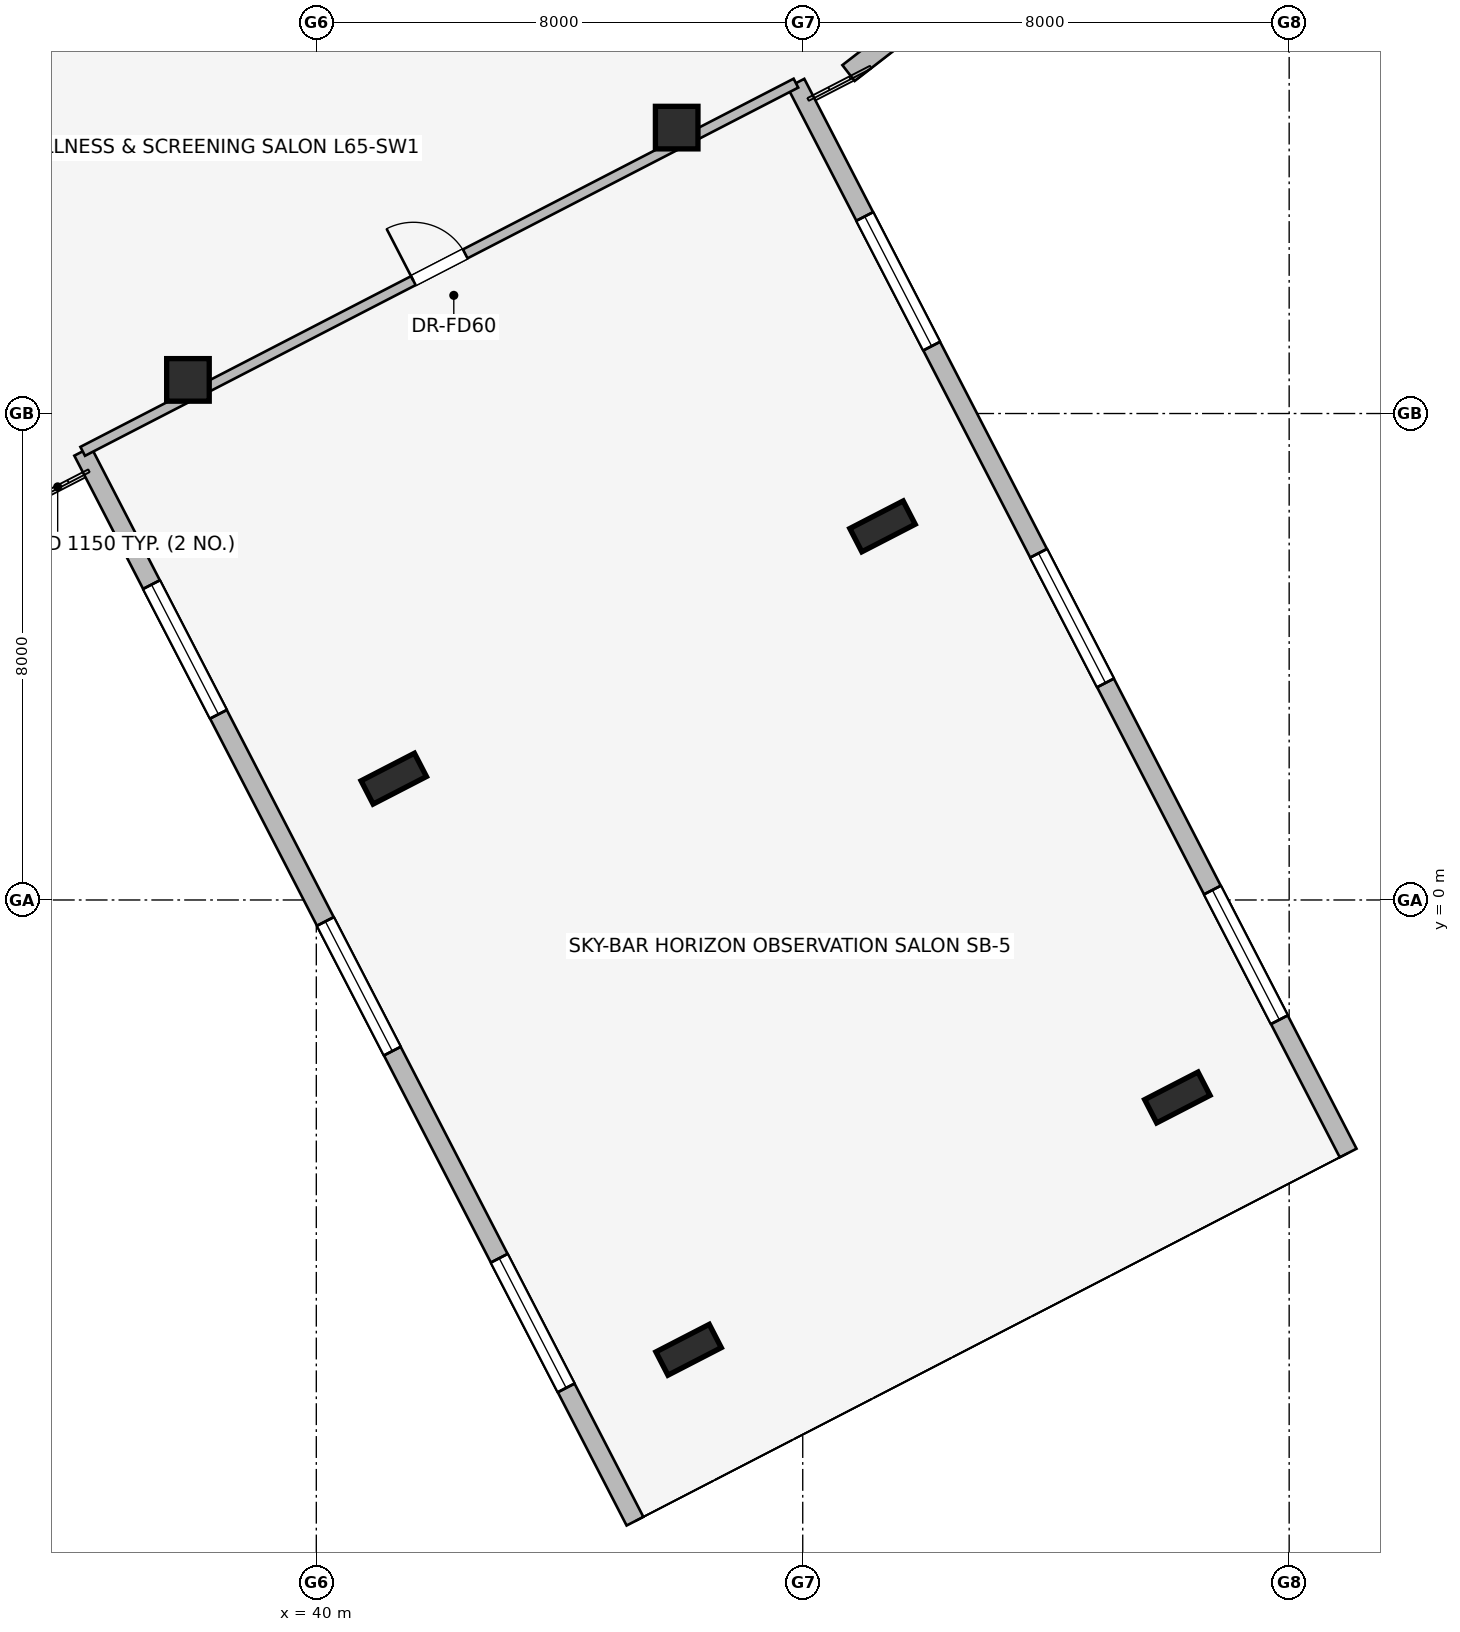
"""IFC4 building model, lengths in metres.
Left out: names, types, materials, properties, quantities, classifications, styles, units other than length and angle.
Written with IfcOpenShell. Run it as: python <this file> out.ifc"""

import sys

from ifc_helpers import new_model, si_unit, direction, frame, frame_2d, origin, origin_2d, place, context, subcontext, project, spatial, rectangle, i_section, extrude, element, fill, save


model = new_model("IFC4")
c1 = context("Model", 3, precision=1e-05, world=origin(), true_north=direction((0.0, 1.0)))
c2 = subcontext(c1, "Body", "Model", "MODEL_VIEW")
j1 = project(units=[si_unit("LENGTHUNIT", "METRE"), si_unit("PLANEANGLEUNIT", "RADIAN")], contexts=[c1])
p1 = place(None, origin())
s1 = spatial("IfcSite", under=j1, at=p1, CompositionType="ELEMENT")
p2 = place(p1, origin())
s2 = spatial("IfcBuilding", under=s1, at=p2, CompositionType="ELEMENT")
p3 = place(p2, frame((0.0, 0.0, 238.35)))
s3 = spatial("IfcBuildingStorey", under=s2, at=p3, CompositionType="ELEMENT", Elevation=238.35)
for number, where, z_axis, x_axis in (
    (1, (37.889, 8.553, 0.0), (0.0, 0.0, 1.0), (1.0, 0.0, 0.0)),
    (2, (45.927, 12.702, 0.0), (0.0, 0.0, 1.0), (1.0, 0.0, 0.0)),
):
    element("IfcColumn", number, at=place(p3, frame(where, z_axis=z_axis, x_axis=x_axis)), inside=s3, PredefinedType="COLUMN", context=c2, shape_type="SweptSolid", body=[
        extrude(rectangle(XDim=0.7, YDim=0.7, at=origin_2d()), origin(), (0.0, 0.0, 1.0), 3.55),
    ])
for number, where, z_axis, x_axis in (
    (3, (41.274, 1.995, 0.0), (0.0, 0.0, 1.0), (0.459, -0.889, 0.0)),
    (4, (49.312, 6.144, 0.0), (0.0, 0.0, 1.0), (0.459, -0.889, 0.0)),
    (5, (46.123, -7.397, 0.0), (0.0, 0.0, 1.0), (0.459, -0.889, 0.0)),
    (6, (54.161, -3.248, 0.0), (0.0, 0.0, 1.0), (0.459, -0.889, 0.0)),
):
    element("IfcColumn", number, at=place(p3, frame(where, z_axis=z_axis, x_axis=x_axis)), inside=s3, PredefinedType="COLUMN", context=c2, shape_type="SweptSolid", body=[
        extrude(i_section(OverallWidth=0.431, OverallDepth=0.987, WebThickness=0.034, FlangeThickness=0.062, at=origin_2d()), origin(), (0.0, 0.0, 1.0), 3.55),
    ])
p4 = place(p3, frame((45.241, -10.216, 0.0), z_axis=(0.0, 0.0, 1.0), x_axis=(-0.45873211625, 0.888574614493, 0.0)))
e7 = element("IfcWall", 7, at=p4, inside=s3, PredefinedType="STANDARD", context=c2, shape_type="SweptSolid", body=[
    extrude(rectangle(XDim=19.8, YDim=0.31, at=frame_2d((9.9, 0.0))), origin(), (0.0, 0.0, 1.0), 3.26),
])
p5 = place(p4, frame((2.467, 0.0, 0.75)))
e8 = element("IfcOpeningElement", 8, at=p5, cuts=e7, PredefinedType="OPENING", context=c2, shape_type="SweptSolid", body=[
    extrude(rectangle(XDim=2.4, YDim=1.6, at=frame_2d((1.2, 0.8))), frame((0.0, 0.165, 0.0), z_axis=(0.0, -1.0, 0.0), x_axis=(1.0, 0.0, 0.0)), (0.0, 0.0, 1.0), 0.33),
])
p6 = place(p4, frame((8.7, 0.0, 0.75)))
e9 = element("IfcOpeningElement", 9, at=p6, cuts=e7, PredefinedType="OPENING", context=c2, shape_type="SweptSolid", body=[
    extrude(rectangle(XDim=2.4, YDim=1.6, at=frame_2d((1.2, 0.8))), frame((0.0, 0.165, 0.0), z_axis=(0.0, -1.0, 0.0), x_axis=(1.0, 0.0, 0.0)), (0.0, 0.0, 1.0), 0.33),
])
p7 = place(p4, frame((14.934, 0.0, 0.75)))
e10 = element("IfcOpeningElement", 10, at=p7, cuts=e7, PredefinedType="OPENING", context=c2, shape_type="SweptSolid", body=[
    extrude(rectangle(XDim=2.4, YDim=1.6, at=frame_2d((1.2, 0.8))), frame((0.0, 0.165, 0.0), z_axis=(0.0, -1.0, 0.0), x_axis=(1.0, 0.0, 0.0)), (0.0, 0.0, 1.0), 0.33),
])
p8 = place(p3, frame((47.888, 13.433, 0.0), z_axis=(0.0, 0.0, 1.0), x_axis=(0.458693173014, -0.888594718097, 0.0)))
e11 = element("IfcWall", 11, at=p8, inside=s3, PredefinedType="STANDARD", context=c2, shape_type="SweptSolid", body=[
    extrude(rectangle(XDim=19.8, YDim=0.31, at=frame_2d((9.9, 0.0))), origin(), (0.0, 0.0, 1.0), 3.26),
])
p9 = place(p8, frame((2.467, 0.0, 0.75)))
e12 = element("IfcOpeningElement", 12, at=p9, cuts=e11, PredefinedType="OPENING", context=c2, shape_type="SweptSolid", body=[
    extrude(rectangle(XDim=2.4, YDim=1.6, at=frame_2d((1.2, 0.8))), frame((0.0, 0.165, 0.0), z_axis=(0.0, -1.0, 0.0), x_axis=(1.0, 0.0, 0.0)), (0.0, 0.0, 1.0), 0.33),
])
p10 = place(p8, frame((8.7, 0.0, 0.75)))
e13 = element("IfcOpeningElement", 13, at=p10, cuts=e11, PredefinedType="OPENING", context=c2, shape_type="SweptSolid", body=[
    extrude(rectangle(XDim=2.4, YDim=1.6, at=frame_2d((1.2, 0.8))), frame((0.0, 0.165, 0.0), z_axis=(0.0, -1.0, 0.0), x_axis=(1.0, 0.0, 0.0)), (0.0, 0.0, 1.0), 0.33),
])
p11 = place(p8, frame((14.933, 0.0, 0.75)))
e14 = element("IfcOpeningElement", 14, at=p11, cuts=e11, PredefinedType="OPENING", context=c2, shape_type="SweptSolid", body=[
    extrude(rectangle(XDim=2.4, YDim=1.6, at=frame_2d((1.2, 0.8))), frame((0.0, 0.165, 0.0), z_axis=(0.0, -1.0, 0.0), x_axis=(1.0, 0.0, 0.0)), (0.0, 0.0, 1.0), 0.33),
])
p12 = place(p3, frame((50.078, 14.625, 0.0), z_axis=(0.0, 0.0, 1.0), x_axis=(-0.790691856293, -0.61221433207, 0.0)))
e15 = element("IfcWall", 15, at=p12, inside=s3, PredefinedType="STANDARD", context=c2, shape_type="SweptSolid", body=[
    extrude(rectangle(XDim=1.676, YDim=0.33, at=frame_2d((0.838, 0.0))), origin(), (0.0, 0.0, 1.0), 3.26),
])
p13 = place(p3, frame((36.158, 7.378, 0.0), z_axis=(0.0, 0.0, 1.0), x_axis=(0.88859001822, 0.458702277648, 0.0)))
e16 = element("IfcWall", 16, at=p13, inside=s3, PredefinedType="PARTITIONING", context=c2, shape_type="SweptSolid", body=[
    extrude(rectangle(XDim=13.201, YDim=0.165, at=frame_2d((6.6, 0.0))), origin(), (0.0, 0.0, 1.0), 2.711),
])
p14 = place(p13, frame((6.12, 0.0, 0.0)))
e17 = element("IfcOpeningElement", 17, at=p14, cuts=e16, PredefinedType="OPENING", context=c2, shape_type="SweptSolid", body=[
    extrude(rectangle(XDim=0.96, YDim=2.0, at=frame_2d((0.48, 1.0))), frame((0.0, 0.093, 0.0), z_axis=(0.0, -1.0, 0.0), x_axis=(1.0, 0.0, 0.0)), (0.0, 0.0, 1.0), 0.185),
])
p15 = place(p5, origin())
e18 = element("IfcWindow", 18, at=p15, inside=s3, PartitioningType="SINGLE_PANEL", PredefinedType="WINDOW", context=c2, shape_type="SweptSolid", body=[
    extrude(rectangle(XDim=2.4, YDim=1.6, at=frame_2d((1.2, 0.8))), frame((0.0, 0.03, 0.0), z_axis=(0.0, -1.0, 0.0), x_axis=(1.0, 0.0, 0.0)), (0.0, 0.0, 1.0), 0.06),
])
fill(e8, e18)
p16 = place(p6, origin())
e19 = element("IfcWindow", 19, at=p16, inside=s3, PartitioningType="SINGLE_PANEL", PredefinedType="WINDOW", context=c2, shape_type="SweptSolid", body=[
    extrude(rectangle(XDim=2.4, YDim=1.6, at=frame_2d((1.2, 0.8))), frame((0.0, 0.03, 0.0), z_axis=(0.0, -1.0, 0.0), x_axis=(1.0, 0.0, 0.0)), (0.0, 0.0, 1.0), 0.06),
])
fill(e9, e19)
p17 = place(p7, origin())
e20 = element("IfcWindow", 20, at=p17, inside=s3, PartitioningType="SINGLE_PANEL", PredefinedType="WINDOW", context=c2, shape_type="SweptSolid", body=[
    extrude(rectangle(XDim=2.4, YDim=1.6, at=frame_2d((1.2, 0.8))), frame((0.0, 0.03, 0.0), z_axis=(0.0, -1.0, 0.0), x_axis=(1.0, 0.0, 0.0)), (0.0, 0.0, 1.0), 0.06),
])
fill(e10, e20)
p18 = place(p9, origin())
e21 = element("IfcWindow", 21, at=p18, inside=s3, PartitioningType="SINGLE_PANEL", PredefinedType="WINDOW", context=c2, shape_type="SweptSolid", body=[
    extrude(rectangle(XDim=2.4, YDim=1.6, at=frame_2d((1.2, 0.8))), frame((0.0, 0.03, 0.0), z_axis=(0.0, -1.0, 0.0), x_axis=(1.0, 0.0, 0.0)), (0.0, 0.0, 1.0), 0.06),
])
fill(e12, e21)
p19 = place(p10, origin())
e22 = element("IfcWindow", 22, at=p19, inside=s3, PartitioningType="SINGLE_PANEL", PredefinedType="WINDOW", context=c2, shape_type="SweptSolid", body=[
    extrude(rectangle(XDim=2.4, YDim=1.6, at=frame_2d((1.2, 0.8))), frame((0.0, 0.03, 0.0), z_axis=(0.0, -1.0, 0.0), x_axis=(1.0, 0.0, 0.0)), (0.0, 0.0, 1.0), 0.06),
])
fill(e13, e22)
p20 = place(p11, origin())
e23 = element("IfcWindow", 23, at=p20, inside=s3, PartitioningType="SINGLE_PANEL", PredefinedType="WINDOW", context=c2, shape_type="SweptSolid", body=[
    extrude(rectangle(XDim=2.4, YDim=1.6, at=frame_2d((1.2, 0.8))), frame((0.0, 0.03, 0.0), z_axis=(0.0, -1.0, 0.0), x_axis=(1.0, 0.0, 0.0)), (0.0, 0.0, 1.0), 0.06),
])
fill(e14, e23)
p21 = place(p14, origin())
e24 = element("IfcDoor", 24, at=p21, inside=s3, OperationType="SINGLE_SWING_LEFT", PredefinedType="DOOR", context=c2, shape_type="SweptSolid", body=[
    extrude(rectangle(XDim=0.96, YDim=2.0, at=frame_2d((0.48, 1.0))), frame((0.0, 0.025, 0.0), z_axis=(0.0, -1.0, 0.0), x_axis=(1.0, 0.0, 0.0)), (0.0, 0.0, 1.0), 0.05),
])
fill(e17, e24)
save(model, sys.argv[1])
